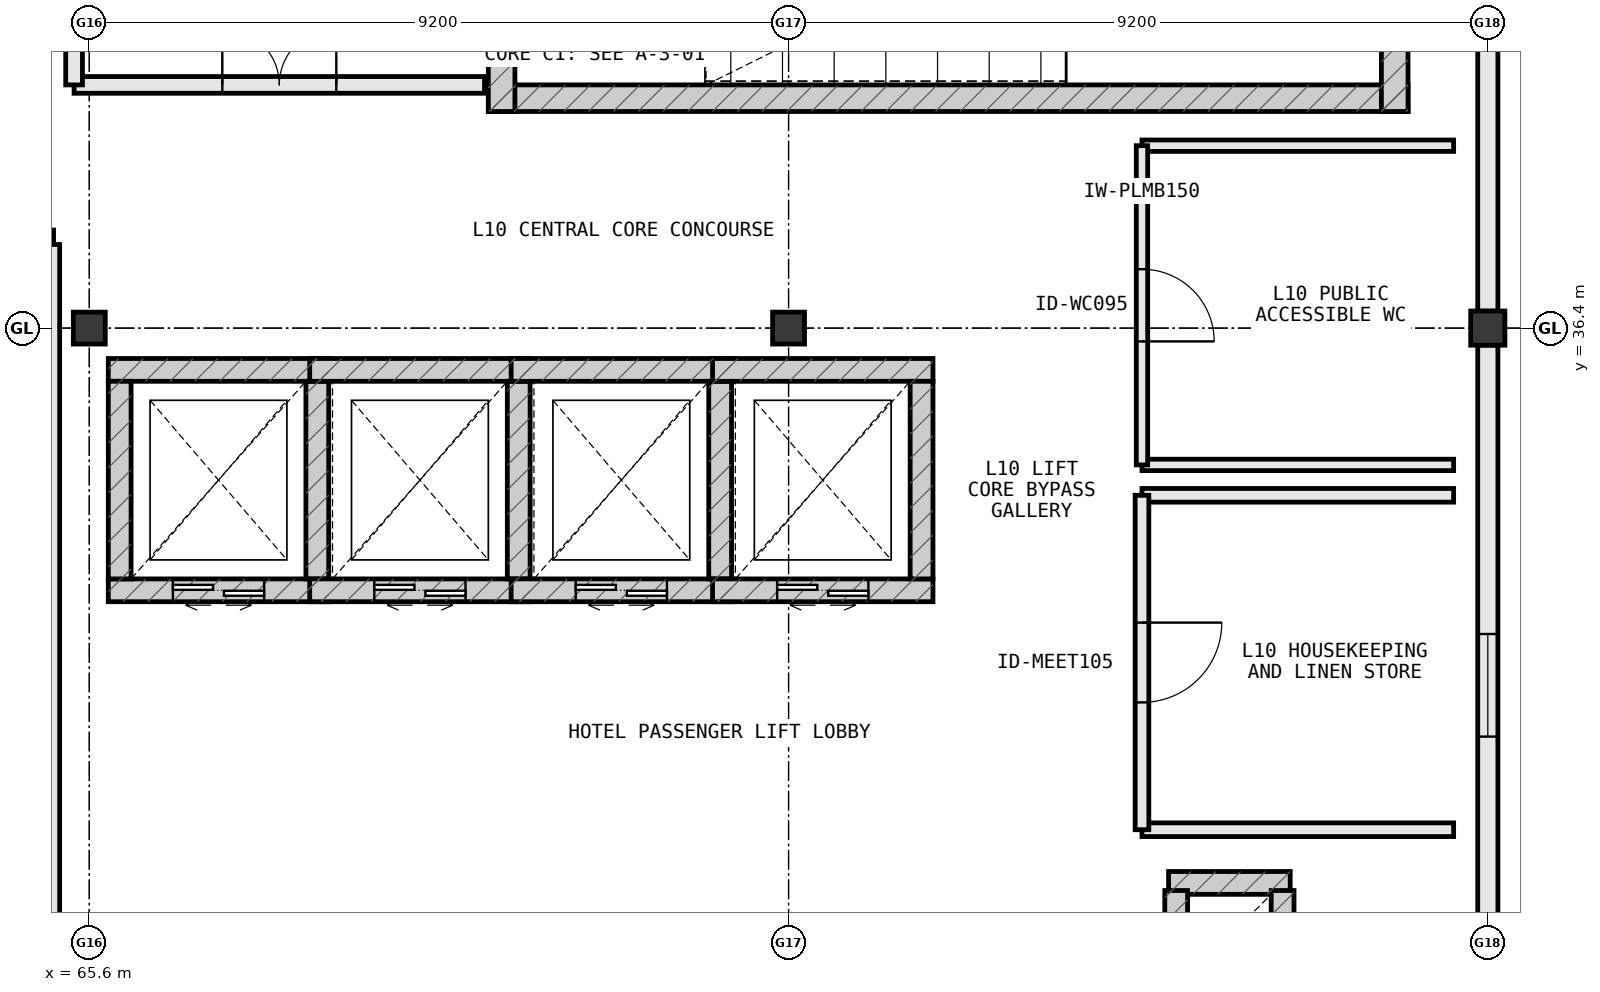
"""IFC4 building model, lengths in metres.
Left out: names, types, materials, properties, quantities, classifications, styles, units other than length and angle.
Written with IfcOpenShell. Run it as: python <this file> out.ifc"""

import sys

from ifc_helpers import new_model, si_unit, direction, frame, frame_2d, origin, origin_2d, place, context, subcontext, project, spatial, rectangle, extrude, element, fill, save


model = new_model("IFC4")
c1 = context("Model", 3, precision=1e-05, world=origin(), true_north=direction((0.0, 1.0)))
c2 = subcontext(c1, "Body", "Model", "MODEL_VIEW")
j1 = project(units=[si_unit("LENGTHUNIT", "METRE"), si_unit("PLANEANGLEUNIT", "RADIAN")], contexts=[c1])
p1 = place(None, origin())
s1 = spatial("IfcSite", under=j1, at=p1, CompositionType="ELEMENT")
p2 = place(p1, origin())
s2 = spatial("IfcBuilding", under=s1, at=p2, CompositionType="ELEMENT")
p3 = place(p2, frame((0.0, 0.0, 42.8)))
s3 = spatial("IfcBuildingStorey", under=s2, at=p3, CompositionType="ELEMENT", Elevation=42.8)
p4 = place(p3, frame((74.8, 36.4, 0.0), z_axis=(0.0, 0.0, 1.0), x_axis=(1.0, 0.0, 0.0)))
e1 = element("IfcColumn", 1, at=p4, inside=s3, PredefinedType="COLUMN", context=c2, shape_type="SweptSolid", body=[
    extrude(rectangle(XDim=0.42, YDim=0.42, at=origin_2d()), origin(), (0.0, 0.0, 1.0), 3.8),
])
p5 = place(p3, frame((84.0, 36.4, 0.0), z_axis=(0.0, 0.0, 1.0), x_axis=(1.0, 0.0, 0.0)))
e2 = element("IfcColumn", 2, at=p5, inside=s3, PredefinedType="COLUMN", context=c2, shape_type="SweptSolid", body=[
    extrude(rectangle(XDim=0.45, YDim=0.45, at=origin_2d()), origin(), (0.0, 0.0, 1.0), 3.8),
])
p6 = place(p3, frame((65.6, 36.4, 0.0), z_axis=(0.0, 0.0, 1.0), x_axis=(1.0, 0.0, 0.0)))
e3 = element("IfcColumn", 3, at=p6, inside=s3, PredefinedType="COLUMN", context=c2, shape_type="SweptSolid", body=[
    extrude(rectangle(XDim=0.42, YDim=0.42, at=origin_2d()), origin(), (0.0, 0.0, 1.0), 3.8),
])
p7 = place(p3, frame((81.4, 29.1, 0.0), z_axis=(0.0, 0.0, 1.0), x_axis=(-1.0, 0.0, 0.0)))
e4 = element("IfcWall", 4, at=p7, inside=s3, PredefinedType="SHEAR", context=c2, shape_type="SweptSolid", body=[
    extrude(rectangle(XDim=1.6, YDim=0.3, at=frame_2d((0.8, 0.0))), origin(), (0.0, 0.0, 1.0), 3.54),
])
for number, where, z_axis, x_axis in (
    (5, (79.9, 29.0, 0.0), (0.0, 0.0, 1.0), (0.0, -1.0, 0.0)),
    (6, (81.3, 27.8, 0.0), (0.0, 0.0, 1.0), (0.0, 1.0, 0.0)),
):
    element("IfcWall", number, at=place(p3, frame(where, z_axis=z_axis, x_axis=x_axis)), inside=s3, PredefinedType="SHEAR", context=c2, shape_type="SweptSolid", body=[
        extrude(rectangle(XDim=1.2, YDim=0.3, at=frame_2d((0.6, 0.0))), origin(), (0.0, 0.0, 1.0), 3.54),
    ])
p8 = place(p3, frame((84.0, 27.223, 0.0), z_axis=(0.0, 0.0, 1.0), x_axis=(0.0, 1.0, 0.0)))
e7 = element("IfcWall", 7, at=p8, inside=s3, PredefinedType="STANDARD", context=c2, shape_type="SweptSolid", body=[
    extrude(rectangle(XDim=8.954, YDim=0.265, at=frame_2d((4.477, 0.0))), origin(), (0.0, 0.0, 1.0), 2.955),
])
p9 = place(p8, frame((3.802, 0.0, 0.85)))
e8 = element("IfcOpeningElement", 8, at=p9, cuts=e7, PredefinedType="OPENING", context=c2, shape_type="SweptSolid", body=[
    extrude(rectangle(XDim=1.35, YDim=1.65, at=frame_2d((0.675, 0.825))), frame((0.0, 0.145, 0.0), z_axis=(0.0, -1.0, 0.0), x_axis=(1.0, 0.0, 0.0)), (0.0, 0.0, 1.0), 0.289),
])
p10 = place(p3, frame((84.0, 36.623, 0.0), z_axis=(0.0, 0.0, 1.0), x_axis=(0.0, 1.0, 0.0)))
e9 = element("IfcWall", 9, at=p10, inside=s3, PredefinedType="STANDARD", context=c2, shape_type="SweptSolid", body=[
    extrude(rectangle(XDim=10.354, YDim=0.265, at=frame_2d((5.177, 0.0))), origin(), (0.0, 0.0, 1.0), 2.955),
])
p11 = place(p10, frame((7.091, 0.0, 0.85)))
e10 = element("IfcOpeningElement", 10, at=p11, cuts=e9, PredefinedType="OPENING", context=c2, shape_type="SweptSolid", body=[
    extrude(rectangle(XDim=1.35, YDim=1.65, at=frame_2d((0.675, 0.825))), frame((0.0, 0.145, 0.0), z_axis=(0.0, -1.0, 0.0), x_axis=(1.0, 0.0, 0.0)), (0.0, 0.0, 1.0), 0.289),
])
p12 = place(p3, frame((70.85, 39.425, 0.0), z_axis=(0.0, 0.0, 1.0), x_axis=(1.0, 0.0, 0.0)))
e11 = element("IfcWall", 11, at=p12, inside=s3, PredefinedType="SHEAR", context=c2, shape_type="SweptSolid", body=[
    extrude(rectangle(XDim=12.1, YDim=0.35, at=frame_2d((6.05, 0.0))), origin(), (0.0, 0.0, 1.0), 3.8),
])
p13 = place(p3, frame((82.775, 39.25, 0.0), z_axis=(0.0, 0.0, 1.0), x_axis=(0.0, 1.0, 0.0)))
e12 = element("IfcWall", 12, at=p13, inside=s3, PredefinedType="SHEAR", context=c2, shape_type="SweptSolid", body=[
    extrude(rectangle(XDim=5.1, YDim=0.35, at=frame_2d((2.55, 0.0))), origin(), (0.0, 0.0, 1.0), 3.8),
])
p14 = place(p3, frame((71.025, 44.35, 0.0), z_axis=(0.0, 0.0, 1.0), x_axis=(0.0, -1.0, 0.0)))
e13 = element("IfcWall", 13, at=p14, inside=s3, PredefinedType="SHEAR", context=c2, shape_type="SweptSolid", body=[
    extrude(rectangle(XDim=5.1, YDim=0.35, at=frame_2d((2.55, 0.0))), origin(), (0.0, 0.0, 1.0), 3.8),
])
p15 = place(p14, frame((2.0, 0.0, 0.0)))
e14 = element("IfcOpeningElement", 14, at=p15, cuts=e13, PredefinedType="OPENING", context=c2, shape_type="SweptSolid", body=[
    extrude(rectangle(XDim=1.1, YDim=2.2, at=frame_2d((0.55, 1.1))), frame((0.0, 0.187, 0.0), z_axis=(0.0, -1.0, 0.0), x_axis=(1.0, 0.0, 0.0)), (0.0, 0.0, 1.0), 0.374),
])
p16 = place(p3, frame((65.85, 32.95, 0.0), z_axis=(0.0, 0.0, 1.0), x_axis=(1.0, 0.0, 0.0)))
e15 = element("IfcWall", 15, at=p16, inside=s3, PredefinedType="SHEAR", context=c2, shape_type="SweptSolid", body=[
    extrude(rectangle(XDim=2.9, YDim=0.3, at=frame_2d((1.45, 0.0))), origin(), (0.0, 0.0, 1.0), 3.8),
])
p17 = place(p16, frame((0.85, 0.0, 0.0)))
e16 = element("IfcOpeningElement", 16, at=p17, cuts=e15, PredefinedType="OPENING", context=c2, shape_type="SweptSolid", body=[
    extrude(rectangle(XDim=1.2, YDim=2.2, at=frame_2d((0.6, 1.1))), frame((0.0, 0.162, 0.0), z_axis=(0.0, -1.0, 0.0), x_axis=(1.0, 0.0, 0.0)), (0.0, 0.0, 1.0), 0.324),
])
p18 = place(p3, frame((68.75, 35.85, 0.0), z_axis=(0.0, 0.0, 1.0), x_axis=(-1.0, 0.0, 0.0)))
e17 = element("IfcWall", 17, at=p18, inside=s3, PredefinedType="SHEAR", context=c2, shape_type="SweptSolid", body=[
    extrude(rectangle(XDim=2.9, YDim=0.3, at=frame_2d((1.45, 0.0))), origin(), (0.0, 0.0, 1.0), 3.8),
])
for number, where, z_axis, x_axis in (
    (18, (68.6, 33.1, 0.0), (0.0, 0.0, 1.0), (0.0, 1.0, 0.0)),
    (19, (66.0, 35.7, 0.0), (0.0, 0.0, 1.0), (0.0, -1.0, 0.0)),
):
    element("IfcWall", number, at=place(p3, frame(where, z_axis=z_axis, x_axis=x_axis)), inside=s3, PredefinedType="SHEAR", context=c2, shape_type="SweptSolid", body=[
        extrude(rectangle(XDim=2.6, YDim=0.3, at=frame_2d((1.3, 0.0))), origin(), (0.0, 0.0, 1.0), 3.8),
    ])
p19 = place(p3, frame((68.5, 32.95, 0.0), z_axis=(0.0, 0.0, 1.0), x_axis=(1.0, 0.0, 0.0)))
e20 = element("IfcWall", 20, at=p19, inside=s3, PredefinedType="SHEAR", context=c2, shape_type="SweptSolid", body=[
    extrude(rectangle(XDim=2.9, YDim=0.3, at=frame_2d((1.45, 0.0))), origin(), (0.0, 0.0, 1.0), 3.8),
])
p20 = place(p19, frame((0.85, 0.0, 0.0)))
e21 = element("IfcOpeningElement", 21, at=p20, cuts=e20, PredefinedType="OPENING", context=c2, shape_type="SweptSolid", body=[
    extrude(rectangle(XDim=1.2, YDim=2.2, at=frame_2d((0.6, 1.1))), frame((0.0, 0.162, 0.0), z_axis=(0.0, -1.0, 0.0), x_axis=(1.0, 0.0, 0.0)), (0.0, 0.0, 1.0), 0.324),
])
p21 = place(p3, frame((71.4, 35.85, 0.0), z_axis=(0.0, 0.0, 1.0), x_axis=(-1.0, 0.0, 0.0)))
e22 = element("IfcWall", 22, at=p21, inside=s3, PredefinedType="SHEAR", context=c2, shape_type="SweptSolid", body=[
    extrude(rectangle(XDim=2.9, YDim=0.3, at=frame_2d((1.45, 0.0))), origin(), (0.0, 0.0, 1.0), 3.8),
])
p22 = place(p3, frame((71.25, 33.1, 0.0), z_axis=(0.0, 0.0, 1.0), x_axis=(0.0, 1.0, 0.0)))
e23 = element("IfcWall", 23, at=p22, inside=s3, PredefinedType="SHEAR", context=c2, shape_type="SweptSolid", body=[
    extrude(rectangle(XDim=2.6, YDim=0.3, at=frame_2d((1.3, 0.0))), origin(), (0.0, 0.0, 1.0), 3.8),
])
p23 = place(p3, frame((71.15, 32.95, 0.0), z_axis=(0.0, 0.0, 1.0), x_axis=(1.0, 0.0, 0.0)))
e24 = element("IfcWall", 24, at=p23, inside=s3, PredefinedType="SHEAR", context=c2, shape_type="SweptSolid", body=[
    extrude(rectangle(XDim=2.9, YDim=0.3, at=frame_2d((1.45, 0.0))), origin(), (0.0, 0.0, 1.0), 3.8),
])
p24 = place(p23, frame((0.85, 0.0, 0.0)))
e25 = element("IfcOpeningElement", 25, at=p24, cuts=e24, PredefinedType="OPENING", context=c2, shape_type="SweptSolid", body=[
    extrude(rectangle(XDim=1.2, YDim=2.2, at=frame_2d((0.6, 1.1))), frame((0.0, 0.162, 0.0), z_axis=(0.0, -1.0, 0.0), x_axis=(1.0, 0.0, 0.0)), (0.0, 0.0, 1.0), 0.324),
])
p25 = place(p3, frame((74.05, 35.85, 0.0), z_axis=(0.0, 0.0, 1.0), x_axis=(-1.0, 0.0, 0.0)))
e26 = element("IfcWall", 26, at=p25, inside=s3, PredefinedType="SHEAR", context=c2, shape_type="SweptSolid", body=[
    extrude(rectangle(XDim=2.9, YDim=0.3, at=frame_2d((1.45, 0.0))), origin(), (0.0, 0.0, 1.0), 3.8),
])
p26 = place(p3, frame((73.9, 33.1, 0.0), z_axis=(0.0, 0.0, 1.0), x_axis=(0.0, 1.0, 0.0)))
e27 = element("IfcWall", 27, at=p26, inside=s3, PredefinedType="SHEAR", context=c2, shape_type="SweptSolid", body=[
    extrude(rectangle(XDim=2.6, YDim=0.3, at=frame_2d((1.3, 0.0))), origin(), (0.0, 0.0, 1.0), 3.8),
])
p27 = place(p3, frame((73.8, 32.95, 0.0), z_axis=(0.0, 0.0, 1.0), x_axis=(1.0, 0.0, 0.0)))
e28 = element("IfcWall", 28, at=p27, inside=s3, PredefinedType="SHEAR", context=c2, shape_type="SweptSolid", body=[
    extrude(rectangle(XDim=2.9, YDim=0.3, at=frame_2d((1.45, 0.0))), origin(), (0.0, 0.0, 1.0), 3.8),
])
p28 = place(p27, frame((0.85, 0.0, 0.0)))
e29 = element("IfcOpeningElement", 29, at=p28, cuts=e28, PredefinedType="OPENING", context=c2, shape_type="SweptSolid", body=[
    extrude(rectangle(XDim=1.2, YDim=2.2, at=frame_2d((0.6, 1.1))), frame((0.0, 0.162, 0.0), z_axis=(0.0, -1.0, 0.0), x_axis=(1.0, 0.0, 0.0)), (0.0, 0.0, 1.0), 0.324),
])
p29 = place(p3, frame((76.7, 35.85, 0.0), z_axis=(0.0, 0.0, 1.0), x_axis=(-1.0, 0.0, 0.0)))
e30 = element("IfcWall", 30, at=p29, inside=s3, PredefinedType="SHEAR", context=c2, shape_type="SweptSolid", body=[
    extrude(rectangle(XDim=2.9, YDim=0.3, at=frame_2d((1.45, 0.0))), origin(), (0.0, 0.0, 1.0), 3.8),
])
p30 = place(p3, frame((76.55, 33.1, 0.0), z_axis=(0.0, 0.0, 1.0), x_axis=(0.0, 1.0, 0.0)))
e31 = element("IfcWall", 31, at=p30, inside=s3, PredefinedType="SHEAR", context=c2, shape_type="SweptSolid", body=[
    extrude(rectangle(XDim=2.6, YDim=0.3, at=frame_2d((1.3, 0.0))), origin(), (0.0, 0.0, 1.0), 3.8),
])
p31 = place(p3, frame((65.4, 39.6, 0.0), z_axis=(0.0, 0.0, 1.0), x_axis=(1.0, 0.0, 0.0)))
e32 = element("IfcWall", 32, at=p31, inside=s3, PredefinedType="STANDARD", context=c2, shape_type="SweptSolid", body=[
    extrude(rectangle(XDim=5.4, YDim=0.22, at=frame_2d((2.7, 0.0))), origin(), (0.0, 0.0, 1.0), 3.54),
])
p32 = place(p31, frame((1.95, 0.0, 0.0)))
e33 = element("IfcOpeningElement", 33, at=p32, cuts=e32, PredefinedType="OPENING", context=c2, shape_type="SweptSolid", body=[
    extrude(rectangle(XDim=1.5, YDim=2.2, at=frame_2d((0.75, 1.1))), frame((0.0, 0.122, 0.0), z_axis=(0.0, -1.0, 0.0), x_axis=(1.0, 0.0, 0.0)), (0.0, 0.0, 1.0), 0.244),
])
p33 = place(p3, frame((65.4, 43.85, 0.0), z_axis=(0.0, 0.0, 1.0), x_axis=(0.0, -1.0, 0.0)))
e34 = element("IfcWall", 34, at=p33, inside=s3, PredefinedType="STANDARD", context=c2, shape_type="SweptSolid", body=[
    extrude(rectangle(XDim=4.25, YDim=0.22, at=frame_2d((2.125, 0.0))), origin(), (0.0, 0.0, 1.0), 3.54),
])
p34 = place(p33, frame((1.375, 0.0, 0.0)))
e35 = element("IfcOpeningElement", 35, at=p34, cuts=e34, PredefinedType="OPENING", context=c2, shape_type="SweptSolid", body=[
    extrude(rectangle(XDim=1.5, YDim=2.2, at=frame_2d((0.75, 1.1))), frame((0.0, 0.122, 0.0), z_axis=(0.0, -1.0, 0.0), x_axis=(1.0, 0.0, 0.0)), (0.0, 0.0, 1.0), 0.244),
])
for number, where, z_axis, x_axis in (
    (36, (79.45, 29.8, 0.0), (0.0, 0.0, 1.0), (1.0, 0.0, 0.0)),
    (37, (83.55, 34.2, 0.0), (0.0, 0.0, 1.0), (-1.0, 0.0, 0.0)),
):
    element("IfcWall", number, at=place(p3, frame(where, z_axis=z_axis, x_axis=x_axis)), inside=s3, PredefinedType="PARTITIONING", context=c2, shape_type="SweptSolid", body=[
        extrude(rectangle(XDim=4.1, YDim=0.18, at=frame_2d((2.05, 0.0))), origin(), (0.0, 0.0, 1.0), 3.54),
    ])
p35 = place(p3, frame((79.45, 34.2, 0.0), z_axis=(0.0, 0.0, 1.0), x_axis=(0.0, -1.0, 0.0)))
e38 = element("IfcWall", 38, at=p35, inside=s3, PredefinedType="PARTITIONING", context=c2, shape_type="SweptSolid", body=[
    extrude(rectangle(XDim=4.4, YDim=0.18, at=frame_2d((2.2, 0.0))), origin(), (0.0, 0.0, 1.0), 3.54),
])
p36 = place(p35, frame((1.675, 0.0, 0.0)))
e39 = element("IfcOpeningElement", 39, at=p36, cuts=e38, PredefinedType="OPENING", context=c2, shape_type="SweptSolid", body=[
    extrude(rectangle(XDim=1.05, YDim=2.2, at=frame_2d((0.525, 1.1))), frame((0.0, 0.102, 0.0), z_axis=(0.0, -1.0, 0.0), x_axis=(1.0, 0.0, 0.0)), (0.0, 0.0, 1.0), 0.204),
])
for number, where, z_axis, x_axis in (
    (40, (79.45, 34.6, 0.0), (0.0, 0.0, 1.0), (1.0, 0.0, 0.0)),
    (41, (83.55, 38.8, 0.0), (0.0, 0.0, 1.0), (-1.0, 0.0, 0.0)),
):
    element("IfcWall", number, at=place(p3, frame(where, z_axis=z_axis, x_axis=x_axis)), inside=s3, PredefinedType="PLUMBINGWALL", context=c2, shape_type="SweptSolid", body=[
        extrude(rectangle(XDim=4.1, YDim=0.15, at=frame_2d((2.05, 0.0))), origin(), (0.0, 0.0, 1.0), 3.54),
    ])
p37 = place(p3, frame((79.45, 38.8, 0.0), z_axis=(0.0, 0.0, 1.0), x_axis=(0.0, -1.0, 0.0)))
e42 = element("IfcWall", 42, at=p37, inside=s3, PredefinedType="PLUMBINGWALL", context=c2, shape_type="SweptSolid", body=[
    extrude(rectangle(XDim=4.2, YDim=0.15, at=frame_2d((2.1, 0.0))), origin(), (0.0, 0.0, 1.0), 3.54),
])
p38 = place(p37, frame((1.625, 0.0, 0.0)))
e43 = element("IfcOpeningElement", 43, at=p38, cuts=e42, PredefinedType="OPENING", context=c2, shape_type="SweptSolid", body=[
    extrude(rectangle(XDim=0.95, YDim=2.15, at=frame_2d((0.475, 1.075))), frame((0.0, 0.087, 0.0), z_axis=(0.0, -1.0, 0.0), x_axis=(1.0, 0.0, 0.0)), (0.0, 0.0, 1.0), 0.174),
])
p39 = place(p3, frame((65.13, 37.6, 0.0), z_axis=(0.0, 0.0, 1.0), x_axis=(-1.0, 0.0, 0.0)))
e44 = element("IfcWall", 44, at=p39, inside=s3, PredefinedType="PARTITIONING", context=c2, shape_type="SweptSolid", body=[
    extrude(rectangle(XDim=4.18, YDim=0.18, at=frame_2d((2.09, 0.0))), origin(), (0.0, 0.0, 1.0), 3.54),
])
p40 = place(p39, frame((0.62, 0.0, 0.0)))
e45 = element("IfcOpeningElement", 45, at=p40, cuts=e44, PredefinedType="OPENING", context=c2, shape_type="SweptSolid", body=[
    extrude(rectangle(XDim=0.98, YDim=2.18, at=frame_2d((0.49, 1.09))), frame((0.0, 0.102, 0.0), z_axis=(0.0, -1.0, 0.0), x_axis=(1.0, 0.0, 0.0)), (0.0, 0.0, 1.0), 0.204),
])
p41 = place(p3, frame((65.13, 27.16, 0.0), z_axis=(0.0, 0.0, 1.0), x_axis=(0.0, 1.0, 0.0)))
e46 = element("IfcWall", 46, at=p41, inside=s3, PredefinedType="PARTITIONING", context=c2, shape_type="SweptSolid", body=[
    extrude(rectangle(XDim=10.34, YDim=0.16, at=frame_2d((5.17, 0.0))), origin(), (0.0, 0.0, 1.0), 3.54),
])
p42 = place(p9, origin())
e47 = element("IfcWindow", 47, at=p42, inside=s3, PartitioningType="SINGLE_PANEL", PredefinedType="WINDOW", context=c2, shape_type="SweptSolid", body=[
    extrude(rectangle(XDim=1.35, YDim=1.65, at=frame_2d((0.675, 0.825))), frame((0.0, 0.03, 0.0), z_axis=(0.0, -1.0, 0.0), x_axis=(1.0, 0.0, 0.0)), (0.0, 0.0, 1.0), 0.06),
])
fill(e8, e47)
p43 = place(p17, origin())
e48 = element("IfcDoor", 48, at=p43, inside=s3, OperationType="DOUBLE_DOOR_SLIDING", PredefinedType="DOOR", context=c2, shape_type="SweptSolid", body=[
    extrude(rectangle(XDim=1.2, YDim=2.2, at=frame_2d((0.6, 1.1))), frame((0.0, 0.025, 0.0), z_axis=(0.0, -1.0, 0.0), x_axis=(1.0, 0.0, 0.0)), (0.0, 0.0, 1.0), 0.05),
])
fill(e16, e48)
p44 = place(p20, origin())
e49 = element("IfcDoor", 49, at=p44, inside=s3, OperationType="DOUBLE_DOOR_SLIDING", PredefinedType="DOOR", context=c2, shape_type="SweptSolid", body=[
    extrude(rectangle(XDim=1.2, YDim=2.2, at=frame_2d((0.6, 1.1))), frame((0.0, 0.025, 0.0), z_axis=(0.0, -1.0, 0.0), x_axis=(1.0, 0.0, 0.0)), (0.0, 0.0, 1.0), 0.05),
])
fill(e21, e49)
p45 = place(p24, origin())
e50 = element("IfcDoor", 50, at=p45, inside=s3, OperationType="DOUBLE_DOOR_SLIDING", PredefinedType="DOOR", context=c2, shape_type="SweptSolid", body=[
    extrude(rectangle(XDim=1.2, YDim=2.2, at=frame_2d((0.6, 1.1))), frame((0.0, 0.025, 0.0), z_axis=(0.0, -1.0, 0.0), x_axis=(1.0, 0.0, 0.0)), (0.0, 0.0, 1.0), 0.05),
])
fill(e25, e50)
p46 = place(p28, origin())
e51 = element("IfcDoor", 51, at=p46, inside=s3, OperationType="DOUBLE_DOOR_SLIDING", PredefinedType="DOOR", context=c2, shape_type="SweptSolid", body=[
    extrude(rectangle(XDim=1.2, YDim=2.2, at=frame_2d((0.6, 1.1))), frame((0.0, 0.025, 0.0), z_axis=(0.0, -1.0, 0.0), x_axis=(1.0, 0.0, 0.0)), (0.0, 0.0, 1.0), 0.05),
])
fill(e29, e51)
p47 = place(p32, origin())
e52 = element("IfcDoor", 52, at=p47, inside=s3, OperationType="DOUBLE_DOOR_SINGLE_SWING", PredefinedType="DOOR", context=c2, shape_type="SweptSolid", body=[
    extrude(rectangle(XDim=1.5, YDim=2.2, at=frame_2d((0.75, 1.1))), frame((0.0, 0.025, 0.0), z_axis=(0.0, -1.0, 0.0), x_axis=(1.0, 0.0, 0.0)), (0.0, 0.0, 1.0), 0.05),
])
fill(e33, e52)
p48 = place(p36, origin())
e53 = element("IfcDoor", 53, at=p48, inside=s3, OperationType="SINGLE_SWING_LEFT", PredefinedType="DOOR", context=c2, shape_type="SweptSolid", body=[
    extrude(rectangle(XDim=1.05, YDim=2.2, at=frame_2d((0.525, 1.1))), frame((0.0, 0.025, 0.0), z_axis=(0.0, -1.0, 0.0), x_axis=(1.0, 0.0, 0.0)), (0.0, 0.0, 1.0), 0.05),
])
fill(e39, e53)
p49 = place(p38, origin())
e54 = element("IfcDoor", 54, at=p49, inside=s3, OperationType="SINGLE_SWING_RIGHT", PredefinedType="DOOR", context=c2, shape_type="SweptSolid", body=[
    extrude(rectangle(XDim=0.95, YDim=2.15, at=frame_2d((0.475, 1.075))), frame((0.0, 0.025, 0.0), z_axis=(0.0, -1.0, 0.0), x_axis=(1.0, 0.0, 0.0)), (0.0, 0.0, 1.0), 0.05),
])
fill(e43, e54)
save(model, sys.argv[1])
